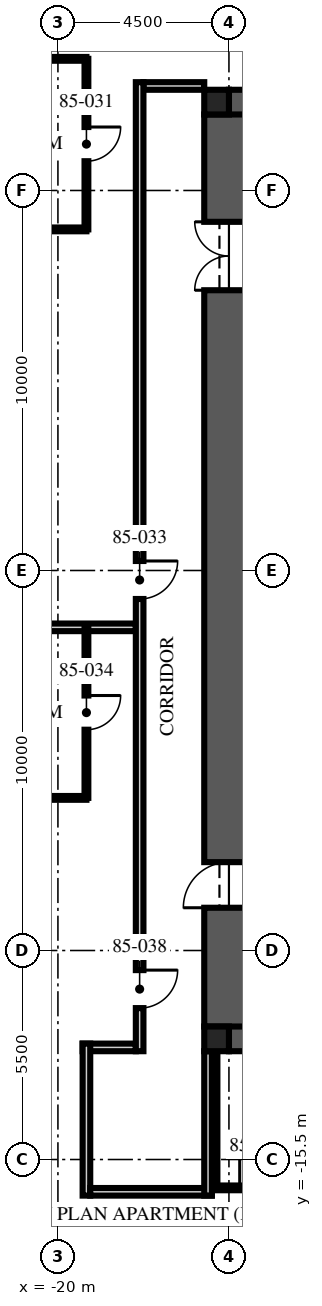
"""IFC4 building model, lengths in metres.
Left out: names, types, materials, properties, quantities, classifications, styles, units other than length and angle.
Written with IfcOpenShell. Run it as: python <this file> out.ifc"""

import sys

from ifc_helpers import new_model, si_unit, direction, frame, frame_2d, origin, origin_2d, place, context, subcontext, project, spatial, rectangle, extrude, element, fill, save


model = new_model("IFC4")
c1 = context("Model", 3, precision=1e-05, world=origin(), true_north=direction((0.0, 1.0)))
c2 = subcontext(c1, "Body", "Model", "MODEL_VIEW")
j1 = project(units=[si_unit("LENGTHUNIT", "METRE"), si_unit("PLANEANGLEUNIT", "RADIAN")], contexts=[c1])
p1 = place(None, origin())
s1 = spatial("IfcSite", under=j1, at=p1, CompositionType="ELEMENT")
p2 = place(p1, origin())
s2 = spatial("IfcBuilding", under=s1, at=p2, CompositionType="ELEMENT")
p3 = place(p2, frame((0.0, 0.0, 338.25)))
s3 = spatial("IfcBuildingStorey", under=s2, at=p3, CompositionType="ELEMENT", Elevation=338.25)
for number, where, z_axis, x_axis in (
    (1, (-15.5, 12.0, -0.25), (0.0, 0.0, 1.0), (1.0, 0.0, 0.0)),
    (2, (-15.5, -12.0, -0.25), (0.0, 0.0, 1.0), (1.0, 0.0, 0.0)),
):
    element("IfcWall", number, at=place(p3, frame(where, z_axis=z_axis, x_axis=x_axis)), inside=s3, PredefinedType="SHEAR", context=c2, shape_type="SweptSolid", body=[
        extrude(rectangle(XDim=31.0, YDim=1.3, at=frame_2d((15.5, 0.0))), origin(), (0.0, 0.0, 1.0), 3.75),
    ])
p4 = place(p3, frame((-15.5, -12.0, -0.25), z_axis=(0.0, 0.0, 1.0), x_axis=(0.0, 1.0, 0.0)))
e3 = element("IfcWall", 3, at=p4, inside=s3, PredefinedType="SHEAR", context=c2, shape_type="SweptSolid", body=[
    extrude(rectangle(XDim=24.0, YDim=1.3, at=frame_2d((12.0, 0.0))), origin(), (0.0, 0.0, 1.0), 3.75),
])
p5 = place(p4, frame((3.125, 0.0, 0.25)))
e4 = element("IfcOpeningElement", 4, at=p5, cuts=e3, PredefinedType="OPENING", context=c2, shape_type="SweptSolid", body=[
    extrude(rectangle(XDim=1.2, YDim=2.1, at=frame_2d((0.6, 1.05))), frame((0.0, 0.66, 0.0), z_axis=(0.0, -1.0, 0.0), x_axis=(1.0, 0.0, 0.0)), (0.0, 0.0, 1.0), 1.32),
])
p6 = place(p4, frame((19.375, 0.0, 0.25)))
e5 = element("IfcOpeningElement", 5, at=p6, cuts=e3, PredefinedType="OPENING", context=c2, shape_type="SweptSolid", body=[
    extrude(rectangle(XDim=1.8, YDim=2.1, at=frame_2d((0.9, 1.05))), frame((0.0, 0.66, 0.0), z_axis=(0.0, -1.0, 0.0), x_axis=(1.0, 0.0, 0.0)), (0.0, 0.0, 1.0), 1.32),
])
for number, where, z_axis, x_axis in (
    (6, (-15.825, 12.325, -0.25), (0.0, 0.0, 1.0), (1.0, 0.0, 0.0)),
    (7, (-15.825, -12.325, -0.25), (0.0, 0.0, 1.0), (1.0, 0.0, 0.0)),
):
    element("IfcColumn", number, at=place(p3, frame(where, z_axis=z_axis, x_axis=x_axis)), inside=s3, PredefinedType="COLUMN", context=c2, shape_type="SweptSolid", body=[
        extrude(rectangle(XDim=0.65, YDim=0.65, at=origin_2d()), origin(), (0.0, 0.0, 1.0), 3.75),
    ])
p7 = place(p3, frame((-17.95, -12.55, 0.0), z_axis=(0.0, 0.0, 1.0), x_axis=(-1.0, 0.0, 0.0)))
e8 = element("IfcWall", 8, at=p7, inside=s3, PredefinedType="PARTITIONING", context=c2, shape_type="SweptSolid", body=[
    extrude(rectangle(XDim=1.4, YDim=0.2, at=frame_2d((0.7, 0.0))), origin(), (0.0, 0.0, 1.0), 3.5),
])
p8 = place(p3, frame((-19.25, -12.45, 0.0), z_axis=(0.0, 0.0, 1.0), x_axis=(0.0, -1.0, 0.0)))
e9 = element("IfcWall", 9, at=p8, inside=s3, PredefinedType="PARTITIONING", context=c2, shape_type="SweptSolid", body=[
    extrude(rectangle(XDim=4.0, YDim=0.2, at=frame_2d((2.0, 0.0))), origin(), (0.0, 0.0, 1.0), 2.9),
])
p9 = place(p3, frame((-19.15, -16.35, 0.0), z_axis=(0.0, 0.0, 1.0), x_axis=(1.0, 0.0, 0.0)))
e10 = element("IfcWall", 10, at=p9, inside=s3, PredefinedType="PARTITIONING", context=c2, shape_type="SweptSolid", body=[
    extrude(rectangle(XDim=3.2, YDim=0.2, at=frame_2d((1.6, 0.0))), origin(), (0.0, 0.0, 1.0), 2.6),
])
p10 = place(p3, frame((-16.05, -16.45, 0.0), z_axis=(0.0, 0.0, 1.0), x_axis=(0.0, 1.0, 0.0)))
e11 = element("IfcWall", 11, at=p10, inside=s3, PredefinedType="PARTITIONING", context=c2, shape_type="SweptSolid", body=[
    extrude(rectangle(XDim=3.8, YDim=0.2, at=frame_2d((1.9, 0.0))), origin(), (0.0, 0.0, 1.0), 2.6),
])
p11 = place(p3, frame((-16.15, 12.75, 0.0), z_axis=(0.0, 0.0, 1.0), x_axis=(-1.0, 0.0, 0.0)))
e12 = element("IfcWall", 12, at=p11, inside=s3, PredefinedType="PARTITIONING", context=c2, shape_type="SweptSolid", body=[
    extrude(rectangle(XDim=1.6, YDim=0.2, at=frame_2d((0.8, 0.0))), origin(), (0.0, 0.0, 1.0), 2.6),
])
for number, where, z_axis, x_axis in (
    (13, (-19.25, 13.464, 0.0), (0.0, 0.0, 1.0), (-1.0, 0.0, 0.0)),
    (14, (-19.25, 8.976, 0.0), (0.0, 0.0, 1.0), (-1.0, 0.0, 0.0)),
):
    element("IfcWall", number, at=place(p3, frame(where, z_axis=z_axis, x_axis=x_axis)), inside=s3, PredefinedType="PARTITIONING", context=c2, shape_type="SweptSolid", body=[
        extrude(rectangle(XDim=3.75, YDim=0.1, at=frame_2d((1.875, 0.0))), origin(), (0.0, 0.0, 1.0), 3.01),
    ])
p12 = place(p3, frame((-17.95, -1.496, 0.0), z_axis=(0.0, 0.0, 1.0), x_axis=(-1.0, 0.0, 0.0)))
e15 = element("IfcWall", 15, at=p12, inside=s3, PredefinedType="PARTITIONING", context=c2, shape_type="SweptSolid", body=[
    extrude(rectangle(XDim=5.05, YDim=0.2, at=frame_2d((2.525, 0.0))), origin(), (0.0, 0.0, 1.0), 3.01),
])
p13 = place(p3, frame((-19.25, -5.984, 0.0), z_axis=(0.0, 0.0, 1.0), x_axis=(-1.0, 0.0, 0.0)))
e16 = element("IfcWall", 16, at=p13, inside=s3, PredefinedType="PARTITIONING", context=c2, shape_type="SweptSolid", body=[
    extrude(rectangle(XDim=3.75, YDim=0.1, at=frame_2d((1.875, 0.0))), origin(), (0.0, 0.0, 1.0), 3.01),
])
p14 = place(p3, frame((-19.25, 13.464, 0.0), z_axis=(0.0, 0.0, 1.0), x_axis=(0.0, -1.0, 0.0)))
e17 = element("IfcWall", 17, at=p14, inside=s3, PredefinedType="PARTITIONING", context=c2, shape_type="SweptSolid", body=[
    extrude(rectangle(XDim=4.488, YDim=0.1, at=frame_2d((2.244, 0.0))), origin(), (0.0, 0.0, 1.0), 2.91),
])
p15 = place(p14, frame((1.794, 0.0, 0.0)))
e18 = element("IfcOpeningElement", 18, at=p15, cuts=e17, PredefinedType="OPENING", context=c2, shape_type="SweptSolid", body=[
    extrude(rectangle(XDim=0.9, YDim=2.1, at=frame_2d((0.45, 1.05))), frame((0.0, 0.06, 0.0), z_axis=(0.0, -1.0, 0.0), x_axis=(1.0, 0.0, 0.0)), (0.0, 0.0, 1.0), 0.12),
])
p16 = place(p3, frame((-19.25, -1.496, 0.0), z_axis=(0.0, 0.0, 1.0), x_axis=(0.0, -1.0, 0.0)))
e19 = element("IfcWall", 19, at=p16, inside=s3, PredefinedType="PARTITIONING", context=c2, shape_type="SweptSolid", body=[
    extrude(rectangle(XDim=4.488, YDim=0.1, at=frame_2d((2.244, 0.0))), origin(), (0.0, 0.0, 1.0), 2.91),
])
p17 = place(p16, frame((1.794, 0.0, 0.0)))
e20 = element("IfcOpeningElement", 20, at=p17, cuts=e19, PredefinedType="OPENING", context=c2, shape_type="SweptSolid", body=[
    extrude(rectangle(XDim=0.9, YDim=2.1, at=frame_2d((0.45, 1.05))), frame((0.0, 0.06, 0.0), z_axis=(0.0, -1.0, 0.0), x_axis=(1.0, 0.0, 0.0)), (0.0, 0.0, 1.0), 0.12),
])
p18 = place(p3, frame((-15.866, -16.246, 0.0), z_axis=(0.0, 0.0, 1.0), x_axis=(1.0, 0.0, 0.0)))
e21 = element("IfcWall", 21, at=p18, inside=s3, PredefinedType="PARTITIONING", context=c2, shape_type="SweptSolid", body=[
    extrude(rectangle(XDim=2.2, YDim=0.125, at=frame_2d((1.1, 0.0))), origin(), (0.0, 0.0, 1.0), 2.9),
])
p19 = place(p18, frame((0.65, 0.0, 0.0)))
e22 = element("IfcOpeningElement", 22, at=p19, cuts=e21, PredefinedType="OPENING", context=c2, shape_type="SweptSolid", body=[
    extrude(rectangle(XDim=0.9, YDim=2.1, at=frame_2d((0.45, 1.05))), frame((0.0, 0.073, 0.0), z_axis=(0.0, -1.0, 0.0), x_axis=(1.0, 0.0, 0.0)), (0.0, 0.0, 1.0), 0.145),
])
p20 = place(p3, frame((-15.866, -12.65, 0.0), z_axis=(0.0, 0.0, 1.0), x_axis=(0.0, -1.0, 0.0)))
e23 = element("IfcWall", 23, at=p20, inside=s3, PredefinedType="PARTITIONING", context=c2, shape_type="SweptSolid", body=[
    extrude(rectangle(XDim=3.596, YDim=0.125, at=frame_2d((1.798, 0.0))), origin(), (0.0, 0.0, 1.0), 2.6),
])
p21 = place(p3, frame((-17.85, 12.85, 0.0), z_axis=(0.0, 0.0, 1.0), x_axis=(0.0, -1.0, 0.0)))
e24 = element("IfcWall", 24, at=p21, inside=s3, PredefinedType="PARTITIONING", context=c2, shape_type="SweptSolid", body=[
    extrude(rectangle(XDim=25.5, YDim=0.2, at=frame_2d((12.75, 0.0))), origin(), (0.0, 0.0, 1.0), 2.9),
])
p22 = place(p21, frame((12.6, 0.0, 0.0)))
e25 = element("IfcOpeningElement", 25, at=p22, cuts=e24, PredefinedType="OPENING", context=c2, shape_type="SweptSolid", body=[
    extrude(rectangle(XDim=1.0, YDim=2.2, at=frame_2d((0.5, 1.1))), frame((0.0, 0.11, 0.0), z_axis=(0.0, -1.0, 0.0), x_axis=(1.0, 0.0, 0.0)), (0.0, 0.0, 1.0), 0.22),
])
p23 = place(p21, frame((23.366, 0.0, 0.0)))
e26 = element("IfcOpeningElement", 26, at=p23, cuts=e24, PredefinedType="OPENING", context=c2, shape_type="SweptSolid", body=[
    extrude(rectangle(XDim=1.0, YDim=2.2, at=frame_2d((0.5, 1.1))), frame((0.0, 0.11, 0.0), z_axis=(0.0, -1.0, 0.0), x_axis=(1.0, 0.0, 0.0)), (0.0, 0.0, 1.0), 0.22),
])
p24 = place(p5, origin())
e27 = element("IfcDoor", 27, at=p24, inside=s3, OperationType="SINGLE_SWING_LEFT", PredefinedType="DOOR", context=c2, shape_type="SweptSolid", body=[
    extrude(rectangle(XDim=1.2, YDim=2.1, at=frame_2d((0.6, 1.05))), frame((0.0, 0.025, 0.0), z_axis=(0.0, -1.0, 0.0), x_axis=(1.0, 0.0, 0.0)), (0.0, 0.0, 1.0), 0.05),
])
fill(e4, e27)
p25 = place(p6, origin())
e28 = element("IfcDoor", 28, at=p25, inside=s3, OperationType="DOUBLE_DOOR_SINGLE_SWING", PredefinedType="DOOR", context=c2, shape_type="SweptSolid", body=[
    extrude(rectangle(XDim=1.8, YDim=2.1, at=frame_2d((0.9, 1.05))), frame((0.0, 0.025, 0.0), z_axis=(0.0, -1.0, 0.0), x_axis=(1.0, 0.0, 0.0)), (0.0, 0.0, 1.0), 0.05),
])
fill(e5, e28)
p26 = place(p15, origin())
e29 = element("IfcDoor", 29, at=p26, inside=s3, OperationType="SINGLE_SWING_LEFT", PredefinedType="DOOR", context=c2, shape_type="SweptSolid", body=[
    extrude(rectangle(XDim=0.9, YDim=2.1, at=frame_2d((0.45, 1.05))), frame((0.0, 0.025, 0.0), z_axis=(0.0, -1.0, 0.0), x_axis=(1.0, 0.0, 0.0)), (0.0, 0.0, 1.0), 0.05),
])
fill(e18, e29)
p27 = place(p22, origin())
e30 = element("IfcDoor", 30, at=p27, inside=s3, OperationType="SINGLE_SWING_LEFT", PredefinedType="DOOR", context=c2, shape_type="SweptSolid", body=[
    extrude(rectangle(XDim=1.0, YDim=2.2, at=frame_2d((0.5, 1.1))), frame((0.0, 0.025, 0.0), z_axis=(0.0, -1.0, 0.0), x_axis=(1.0, 0.0, 0.0)), (0.0, 0.0, 1.0), 0.05),
])
fill(e25, e30)
p28 = place(p17, origin())
e31 = element("IfcDoor", 31, at=p28, inside=s3, OperationType="SINGLE_SWING_LEFT", PredefinedType="DOOR", context=c2, shape_type="SweptSolid", body=[
    extrude(rectangle(XDim=0.9, YDim=2.1, at=frame_2d((0.45, 1.05))), frame((0.0, 0.025, 0.0), z_axis=(0.0, -1.0, 0.0), x_axis=(1.0, 0.0, 0.0)), (0.0, 0.0, 1.0), 0.05),
])
fill(e20, e31)
p29 = place(p19, origin())
e32 = element("IfcDoor", 32, at=p29, inside=s3, OperationType="SINGLE_SWING_LEFT", PredefinedType="DOOR", context=c2, shape_type="SweptSolid", body=[
    extrude(rectangle(XDim=0.9, YDim=2.1, at=frame_2d((0.45, 1.05))), frame((0.0, 0.025, 0.0), z_axis=(0.0, -1.0, 0.0), x_axis=(1.0, 0.0, 0.0)), (0.0, 0.0, 1.0), 0.05),
])
fill(e22, e32)
p30 = place(p23, origin())
e33 = element("IfcDoor", 33, at=p30, inside=s3, OperationType="SINGLE_SWING_LEFT", PredefinedType="DOOR", context=c2, shape_type="SweptSolid", body=[
    extrude(rectangle(XDim=1.0, YDim=2.2, at=frame_2d((0.5, 1.1))), frame((0.0, 0.025, 0.0), z_axis=(0.0, -1.0, 0.0), x_axis=(1.0, 0.0, 0.0)), (0.0, 0.0, 1.0), 0.05),
])
fill(e26, e33)
save(model, sys.argv[1])
